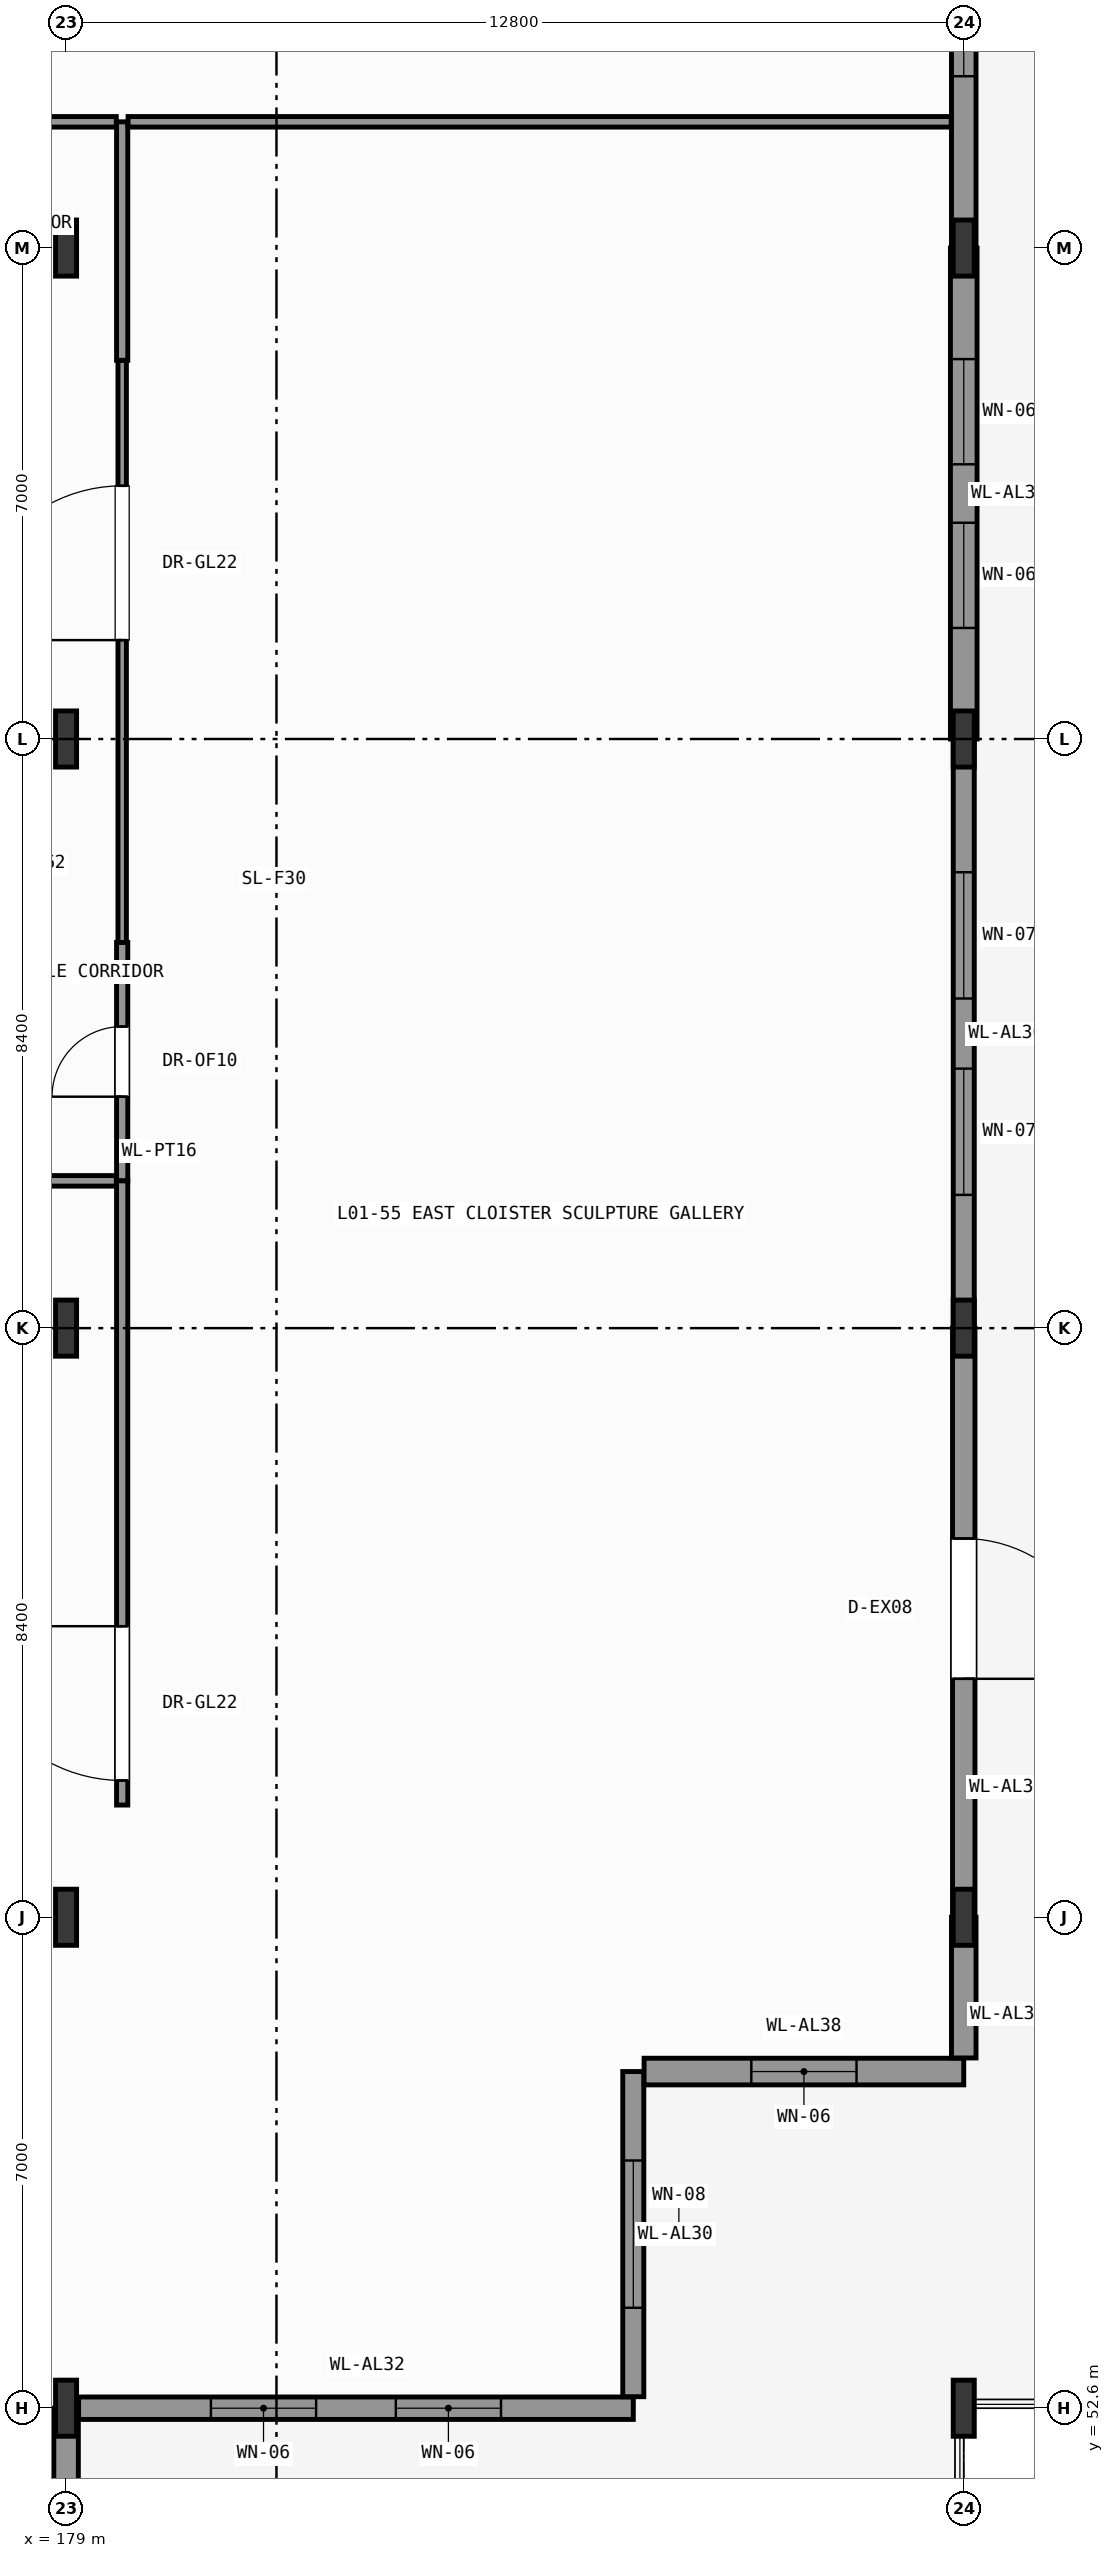
"""IFC4 building model, lengths in metres.
Left out: names, types, materials, properties, quantities, classifications, styles, units other than length and angle.
Written with IfcOpenShell. Run it as: python <this file> out.ifc"""

import sys

from ifc_helpers import new_model, si_unit, direction, frame, frame_2d, origin, origin_2d, place, context, subcontext, project, spatial, rectangle, i_section, extrude, element, fill, save


model = new_model("IFC4")
c1 = context("Model", 3, precision=1e-05, world=origin(), true_north=direction((0.0, 1.0)))
c2 = subcontext(c1, "Body", "Model", "MODEL_VIEW")
j1 = project(units=[si_unit("LENGTHUNIT", "METRE"), si_unit("PLANEANGLEUNIT", "RADIAN")], contexts=[c1])
p1 = place(None, origin())
s1 = spatial("IfcSite", under=j1, at=p1, CompositionType="ELEMENT")
p2 = place(p1, origin())
s2 = spatial("IfcBuilding", under=s1, at=p2, CompositionType="ELEMENT")
p3 = place(p2, origin())
s3 = spatial("IfcBuildingStorey", under=s2, at=p3, CompositionType="ELEMENT", Elevation=0.0)
for number, where, z_axis, x_axis in (
    (1, (179.0, 52.6, 0.0), (0.0, 0.0, 1.0), (1.0, 0.0, 0.0)),
    (2, (179.0, 59.6, 0.0), (0.0, 0.0, 1.0), (1.0, 0.0, 0.0)),
    (3, (179.0, 68.0, 0.0), (0.0, 0.0, 1.0), (1.0, 0.0, 0.0)),
    (4, (179.0, 76.4, 0.0), (0.0, 0.0, 1.0), (1.0, 0.0, 0.0)),
    (5, (179.0, 83.4, 0.0), (0.0, 0.0, 1.0), (1.0, 0.0, 0.0)),
    (6, (191.8, 52.6, 0.0), (0.0, 0.0, 1.0), (1.0, 0.0, 0.0)),
    (7, (191.8, 59.6, 0.0), (0.0, 0.0, 1.0), (1.0, 0.0, 0.0)),
    (8, (191.8, 68.0, 0.0), (0.0, 0.0, 1.0), (1.0, 0.0, 0.0)),
    (9, (191.8, 76.4, 0.0), (0.0, 0.0, 1.0), (1.0, 0.0, 0.0)),
    (10, (191.8, 83.4, 0.0), (0.0, 0.0, 1.0), (1.0, 0.0, 0.0)),
):
    element("IfcColumn", number, at=place(p3, frame(where, z_axis=z_axis, x_axis=x_axis)), inside=s3, PredefinedType="COLUMN", context=c2, shape_type="SweptSolid", body=[
        extrude(i_section(OverallWidth=0.3, OverallDepth=0.8, WebThickness=0.018, FlangeThickness=0.033, FilletRadius=0.03, at=origin_2d()), origin(), (0.0, 0.0, 1.0), 7.8),
    ])
p4 = place(p3, frame((179.0, 52.6, 0.0), z_axis=(0.0, 0.0, 1.0), x_axis=(0.0, -1.0, 0.0)))
e11 = element("IfcWall", 11, at=p4, inside=s3, PredefinedType="SOLIDWALL", context=c2, shape_type="SweptSolid", body=[
    extrude(rectangle(XDim=7.0, YDim=0.35, at=frame_2d((3.5, 0.0))), origin(), (0.0, 0.0, 1.0), 7.025),
])
p5 = place(p4, frame((1.433, 0.0, 0.95)))
e12 = element("IfcOpeningElement", 12, at=p5, cuts=e11, PredefinedType="OPENING", context=c2, shape_type="SweptSolid", body=[
    extrude(rectangle(XDim=1.8, YDim=2.6, at=frame_2d((0.9, 1.3))), frame((0.0, 0.185, 0.0), z_axis=(0.0, -1.0, 0.0), x_axis=(1.0, 0.0, 0.0)), (0.0, 0.0, 1.0), 0.37),
])
p6 = place(p4, frame((3.767, 0.0, 0.95)))
e13 = element("IfcOpeningElement", 13, at=p6, cuts=e11, PredefinedType="OPENING", context=c2, shape_type="SweptSolid", body=[
    extrude(rectangle(XDim=1.8, YDim=2.6, at=frame_2d((0.9, 1.3))), frame((0.0, 0.185, 0.0), z_axis=(0.0, -1.0, 0.0), x_axis=(1.0, 0.0, 0.0)), (0.0, 0.0, 1.0), 0.37),
])
p7 = place(p3, frame((187.088, 52.6, 0.0), z_axis=(0.0, 0.0, 1.0), x_axis=(-1.0, 0.0, 0.0)))
e14 = element("IfcWall", 14, at=p7, inside=s3, PredefinedType="SOLIDWALL", context=c2, shape_type="SweptSolid", body=[
    extrude(rectangle(XDim=7.909, YDim=0.32, at=frame_2d((3.955, 0.0))), origin(), (0.0, 0.0, 1.0), 7.54),
])
p8 = place(p7, frame((1.886, 0.0, 0.95)))
e15 = element("IfcOpeningElement", 15, at=p8, cuts=e14, PredefinedType="OPENING", context=c2, shape_type="SweptSolid", body=[
    extrude(rectangle(XDim=1.5, YDim=2.4, at=frame_2d((0.75, 1.2))), frame((0.0, 0.17, 0.0), z_axis=(0.0, -1.0, 0.0), x_axis=(1.0, 0.0, 0.0)), (0.0, 0.0, 1.0), 0.34),
])
p9 = place(p7, frame((4.523, 0.0, 0.95)))
e16 = element("IfcOpeningElement", 16, at=p9, cuts=e14, PredefinedType="OPENING", context=c2, shape_type="SweptSolid", body=[
    extrude(rectangle(XDim=1.5, YDim=2.4, at=frame_2d((0.75, 1.2))), frame((0.0, 0.17, 0.0), z_axis=(0.0, -1.0, 0.0), x_axis=(1.0, 0.0, 0.0)), (0.0, 0.0, 1.0), 0.34),
])
p10 = place(p3, frame((187.088, 57.4, 0.0), z_axis=(0.0, 0.0, 1.0), x_axis=(0.0, -1.0, 0.0)))
e17 = element("IfcWall", 17, at=p10, inside=s3, PredefinedType="SOLIDWALL", context=c2, shape_type="SweptSolid", body=[
    extrude(rectangle(XDim=4.636, YDim=0.3, at=frame_2d((2.318, 0.0))), origin(), (0.0, 0.0, 1.0), 7.54),
])
p11 = place(p10, frame((1.268, 0.0, 0.95)))
e18 = element("IfcOpeningElement", 18, at=p11, cuts=e17, PredefinedType="OPENING", context=c2, shape_type="SweptSolid", body=[
    extrude(rectangle(XDim=2.1, YDim=2.8, at=frame_2d((1.05, 1.4))), frame((0.0, 0.16, 0.0), z_axis=(0.0, -1.0, 0.0), x_axis=(1.0, 0.0, 0.0)), (0.0, 0.0, 1.0), 0.32),
])
p12 = place(p3, frame((191.8, 57.4, 0.0), z_axis=(0.0, 0.0, 1.0), x_axis=(-1.0, 0.0, 0.0)))
e19 = element("IfcWall", 19, at=p12, inside=s3, PredefinedType="SOLIDWALL", context=c2, shape_type="SweptSolid", body=[
    extrude(rectangle(XDim=4.558, YDim=0.38, at=frame_2d((2.279, 0.0))), origin(), (0.0, 0.0, 1.0), 7.54),
])
p13 = place(p12, frame((1.529, 0.0, 0.95)))
e20 = element("IfcOpeningElement", 20, at=p13, cuts=e19, PredefinedType="OPENING", context=c2, shape_type="SweptSolid", body=[
    extrude(rectangle(XDim=1.5, YDim=2.4, at=frame_2d((0.75, 1.2))), frame((0.0, 0.2, 0.0), z_axis=(0.0, -1.0, 0.0), x_axis=(1.0, 0.0, 0.0)), (0.0, 0.0, 1.0), 0.4),
])
p14 = place(p3, frame((191.8, 59.6, 0.0), z_axis=(0.0, 0.0, 1.0), x_axis=(0.0, -1.0, 0.0)))
e21 = element("IfcWall", 21, at=p14, inside=s3, PredefinedType="SOLIDWALL", context=c2, shape_type="SweptSolid", body=[
    extrude(rectangle(XDim=2.006, YDim=0.35, at=frame_2d((1.003, 0.0))), origin(), (0.0, 0.0, 1.0), 7.54),
])
p15 = place(p3, frame((191.8, 68.0, 0.0), z_axis=(0.0, 0.0, 1.0), x_axis=(0.0, -1.0, 0.0)))
e22 = element("IfcWall", 22, at=p15, inside=s3, PredefinedType="SOLIDWALL", context=c2, shape_type="SweptSolid", body=[
    extrude(rectangle(XDim=8.4, YDim=0.32, at=frame_2d((4.2, 0.0))), origin(), (0.0, 0.0, 1.0), 7.085),
])
p16 = place(p15, frame((3.0, 0.0, 0.0)))
e23 = element("IfcOpeningElement", 23, at=p16, cuts=e22, PredefinedType="OPENING", context=c2, shape_type="SweptSolid", body=[
    extrude(rectangle(XDim=2.0, YDim=2.6, at=frame_2d((1.0, 1.3))), frame((0.0, 0.17, 0.0), z_axis=(0.0, -1.0, 0.0), x_axis=(1.0, 0.0, 0.0)), (0.0, 0.0, 1.0), 0.34),
])
p17 = place(p3, frame((191.8, 76.4, 0.0), z_axis=(0.0, 0.0, 1.0), x_axis=(0.0, -1.0, 0.0)))
e24 = element("IfcWall", 24, at=p17, inside=s3, PredefinedType="SOLIDWALL", context=c2, shape_type="SweptSolid", body=[
    extrude(rectangle(XDim=8.4, YDim=0.3, at=frame_2d((4.2, 0.0))), origin(), (0.0, 0.0, 1.0), 7.085),
])
p18 = place(p17, frame((1.9, 0.0, 0.95)))
e25 = element("IfcOpeningElement", 25, at=p18, cuts=e24, PredefinedType="OPENING", context=c2, shape_type="SweptSolid", body=[
    extrude(rectangle(XDim=1.8, YDim=2.6, at=frame_2d((0.9, 1.3))), frame((0.0, 0.16, 0.0), z_axis=(0.0, -1.0, 0.0), x_axis=(1.0, 0.0, 0.0)), (0.0, 0.0, 1.0), 0.32),
])
p19 = place(p17, frame((4.7, 0.0, 0.95)))
e26 = element("IfcOpeningElement", 26, at=p19, cuts=e24, PredefinedType="OPENING", context=c2, shape_type="SweptSolid", body=[
    extrude(rectangle(XDim=1.8, YDim=2.6, at=frame_2d((0.9, 1.3))), frame((0.0, 0.16, 0.0), z_axis=(0.0, -1.0, 0.0), x_axis=(1.0, 0.0, 0.0)), (0.0, 0.0, 1.0), 0.32),
])
p20 = place(p3, frame((191.8, 83.4, 0.0), z_axis=(0.0, 0.0, 1.0), x_axis=(0.0, -1.0, 0.0)))
e27 = element("IfcWall", 27, at=p20, inside=s3, PredefinedType="SOLIDWALL", context=c2, shape_type="SweptSolid", body=[
    extrude(rectangle(XDim=7.0, YDim=0.38, at=frame_2d((3.5, 0.0))), origin(), (0.0, 0.0, 1.0), 7.235),
])
p21 = place(p20, frame((1.583, 0.0, 0.95)))
e28 = element("IfcOpeningElement", 28, at=p21, cuts=e27, PredefinedType="OPENING", context=c2, shape_type="SweptSolid", body=[
    extrude(rectangle(XDim=1.5, YDim=2.4, at=frame_2d((0.75, 1.2))), frame((0.0, 0.2, 0.0), z_axis=(0.0, -1.0, 0.0), x_axis=(1.0, 0.0, 0.0)), (0.0, 0.0, 1.0), 0.4),
])
p22 = place(p20, frame((3.917, 0.0, 0.95)))
e29 = element("IfcOpeningElement", 29, at=p22, cuts=e27, PredefinedType="OPENING", context=c2, shape_type="SweptSolid", body=[
    extrude(rectangle(XDim=1.5, YDim=2.4, at=frame_2d((0.75, 1.2))), frame((0.0, 0.2, 0.0), z_axis=(0.0, -1.0, 0.0), x_axis=(1.0, 0.0, 0.0)), (0.0, 0.0, 1.0), 0.4),
])
p23 = place(p3, frame((191.8, 90.4, 0.0), z_axis=(0.0, 0.0, 1.0), x_axis=(0.0, -1.0, 0.0)))
e30 = element("IfcWall", 30, at=p23, inside=s3, PredefinedType="SOLIDWALL", context=c2, shape_type="SweptSolid", body=[
    extrude(rectangle(XDim=7.0, YDim=0.35, at=frame_2d((3.5, 0.0))), origin(), (0.0, 0.0, 1.0), 7.235),
])
p24 = place(p23, frame((2.45, 0.0, 0.95)))
e31 = element("IfcOpeningElement", 31, at=p24, cuts=e30, PredefinedType="OPENING", context=c2, shape_type="SweptSolid", body=[
    extrude(rectangle(XDim=2.1, YDim=2.8, at=frame_2d((1.05, 1.4))), frame((0.0, 0.185, 0.0), z_axis=(0.0, -1.0, 0.0), x_axis=(1.0, 0.0, 0.0)), (0.0, 0.0, 1.0), 0.37),
])
p25 = place(p3, frame((179.8, 70.1, 0.0), z_axis=(0.0, 0.0, 1.0), x_axis=(0.0, 1.0, 0.0)))
e32 = element("IfcWall", 32, at=p25, inside=s3, PredefinedType="PARTITIONING", context=c2, shape_type="SweptSolid", body=[
    extrude(rectangle(XDim=3.4, YDim=0.16, at=frame_2d((1.7, 0.0))), origin(), (0.0, 0.0, 1.0), 7.54),
])
p26 = place(p25, frame((1.2, 0.0, 0.0)))
e33 = element("IfcOpeningElement", 33, at=p26, cuts=e32, PredefinedType="OPENING", context=c2, shape_type="SweptSolid", body=[
    extrude(rectangle(XDim=1.0, YDim=2.15, at=frame_2d((0.5, 1.075))), frame((0.0, 0.09, 0.0), z_axis=(0.0, -1.0, 0.0), x_axis=(1.0, 0.0, 0.0)), (0.0, 0.0, 1.0), 0.18),
])
p27 = place(p3, frame((170.464, 70.1, 0.0), z_axis=(0.0, 0.0, 1.0), x_axis=(1.0, 0.0, 0.0)))
e34 = element("IfcWall", 34, at=p27, inside=s3, PredefinedType="PARTITIONING", context=c2, shape_type="SweptSolid", body=[
    extrude(rectangle(XDim=9.252, YDim=0.15, at=frame_2d((4.626, 0.0))), origin(), (0.0, 0.0, 1.0), 7.54),
])
p28 = place(p27, frame((3.526, 0.0, 0.0)))
e35 = element("IfcOpeningElement", 35, at=p28, cuts=e34, PredefinedType="OPENING", context=c2, shape_type="SweptSolid", body=[
    extrude(rectangle(XDim=2.2, YDim=2.6, at=frame_2d((1.1, 1.3))), frame((0.0, 0.085, 0.0), z_axis=(0.0, -1.0, 0.0), x_axis=(1.0, 0.0, 0.0)), (0.0, 0.0, 1.0), 0.17),
])
p29 = place(p3, frame((179.8, 73.5, 0.0), z_axis=(0.0, 0.0, 1.0), x_axis=(0.0, 1.0, 0.0)))
e36 = element("IfcWall", 36, at=p29, inside=s3, PredefinedType="PARTITIONING", context=c2, shape_type="SweptSolid", body=[
    extrude(rectangle(XDim=8.3, YDim=0.12, at=frame_2d((4.15, 0.0))), origin(), (0.0, 0.0, 1.0), 7.54),
])
p30 = place(p29, frame((4.31, 0.0, 0.0)))
e37 = element("IfcOpeningElement", 37, at=p30, cuts=e36, PredefinedType="OPENING", context=c2, shape_type="SweptSolid", body=[
    extrude(rectangle(XDim=2.2, YDim=2.6, at=frame_2d((1.1, 1.3))), frame((0.0, 0.07, 0.0), z_axis=(0.0, -1.0, 0.0), x_axis=(1.0, 0.0, 0.0)), (0.0, 0.0, 1.0), 0.14),
])
p31 = place(p3, frame((179.8, 81.8, 0.0), z_axis=(0.0, 0.0, 1.0), x_axis=(0.0, 1.0, 0.0)))
e38 = element("IfcWall", 38, at=p31, inside=s3, PredefinedType="PARTITIONING", context=c2, shape_type="SweptSolid", body=[
    extrude(rectangle(XDim=3.4, YDim=0.16, at=frame_2d((1.7, 0.0))), origin(), (0.0, 0.0, 1.0), 7.54),
])
p32 = place(p3, frame((170.4, 85.2, 0.0), z_axis=(0.0, 0.0, 1.0), x_axis=(1.0, 0.0, 0.0)))
e39 = element("IfcWall", 39, at=p32, inside=s3, PredefinedType="PARTITIONING", context=c2, shape_type="SweptSolid", body=[
    extrude(rectangle(XDim=9.316, YDim=0.15, at=frame_2d((4.658, 0.0))), origin(), (0.0, 0.0, 1.0), 7.54),
])
p33 = place(p32, frame((4.183, 0.0, 0.0)))
e40 = element("IfcOpeningElement", 40, at=p33, cuts=e39, PredefinedType="OPENING", context=c2, shape_type="SweptSolid", body=[
    extrude(rectangle(XDim=0.95, YDim=2.1, at=frame_2d((0.475, 1.05))), frame((0.0, 0.085, 0.0), z_axis=(0.0, -1.0, 0.0), x_axis=(1.0, 0.0, 0.0)), (0.0, 0.0, 1.0), 0.17),
])
p34 = place(p3, frame((179.8, 61.2, 0.0), z_axis=(0.0, 0.0, 1.0), x_axis=(0.0, 1.0, 0.0)))
e41 = element("IfcWall", 41, at=p34, inside=s3, PredefinedType="PARTITIONING", context=c2, shape_type="SweptSolid", body=[
    extrude(rectangle(XDim=8.9, YDim=0.16, at=frame_2d((4.45, 0.0))), origin(), (0.0, 0.0, 1.0), 7.54),
])
p35 = place(p34, frame((0.35, 0.0, 0.0)))
e42 = element("IfcOpeningElement", 42, at=p35, cuts=e41, PredefinedType="OPENING", context=c2, shape_type="SweptSolid", body=[
    extrude(rectangle(XDim=2.2, YDim=2.6, at=frame_2d((1.1, 1.3))), frame((0.0, 0.09, 0.0), z_axis=(0.0, -1.0, 0.0), x_axis=(1.0, 0.0, 0.0)), (0.0, 0.0, 1.0), 0.18),
])
p36 = place(p3, frame((179.884, 85.2, 0.0), z_axis=(0.0, 0.0, 1.0), x_axis=(1.0, 0.0, 0.0)))
e43 = element("IfcWall", 43, at=p36, inside=s3, PredefinedType="PARTITIONING", context=c2, shape_type="SweptSolid", body=[
    extrude(rectangle(XDim=11.737, YDim=0.15, at=frame_2d((5.869, 0.0))), origin(), (0.0, 0.0, 1.0), 7.54),
])
p37 = place(p8, origin())
e44 = element("IfcWindow", 44, at=p37, inside=s3, PartitioningType="SINGLE_PANEL", PredefinedType="WINDOW", context=c2, shape_type="SweptSolid", body=[
    extrude(rectangle(XDim=1.5, YDim=2.4, at=frame_2d((0.75, 1.2))), frame((0.0, 0.03, 0.0), z_axis=(0.0, -1.0, 0.0), x_axis=(1.0, 0.0, 0.0)), (0.0, 0.0, 1.0), 0.06),
])
fill(e15, e44)
p38 = place(p9, origin())
e45 = element("IfcWindow", 45, at=p38, inside=s3, PartitioningType="SINGLE_PANEL", PredefinedType="WINDOW", context=c2, shape_type="SweptSolid", body=[
    extrude(rectangle(XDim=1.5, YDim=2.4, at=frame_2d((0.75, 1.2))), frame((0.0, 0.03, 0.0), z_axis=(0.0, -1.0, 0.0), x_axis=(1.0, 0.0, 0.0)), (0.0, 0.0, 1.0), 0.06),
])
fill(e16, e45)
p39 = place(p11, origin())
e46 = element("IfcWindow", 46, at=p39, inside=s3, PartitioningType="SINGLE_PANEL", PredefinedType="WINDOW", context=c2, shape_type="SweptSolid", body=[
    extrude(rectangle(XDim=2.1, YDim=2.8, at=frame_2d((1.05, 1.4))), frame((0.0, 0.03, 0.0), z_axis=(0.0, -1.0, 0.0), x_axis=(1.0, 0.0, 0.0)), (0.0, 0.0, 1.0), 0.06),
])
fill(e18, e46)
p40 = place(p13, origin())
e47 = element("IfcWindow", 47, at=p40, inside=s3, PartitioningType="SINGLE_PANEL", PredefinedType="WINDOW", context=c2, shape_type="SweptSolid", body=[
    extrude(rectangle(XDim=1.5, YDim=2.4, at=frame_2d((0.75, 1.2))), frame((0.0, 0.03, 0.0), z_axis=(0.0, -1.0, 0.0), x_axis=(1.0, 0.0, 0.0)), (0.0, 0.0, 1.0), 0.06),
])
fill(e20, e47)
p41 = place(p16, origin())
e48 = element("IfcDoor", 48, at=p41, inside=s3, OperationType="SINGLE_SWING_RIGHT", PredefinedType="DOOR", context=c2, shape_type="SweptSolid", body=[
    extrude(rectangle(XDim=2.0, YDim=2.6, at=frame_2d((1.0, 1.3))), frame((0.0, 0.025, 0.0), z_axis=(0.0, -1.0, 0.0), x_axis=(1.0, 0.0, 0.0)), (0.0, 0.0, 1.0), 0.05),
])
fill(e23, e48)
p42 = place(p18, origin())
e49 = element("IfcWindow", 49, at=p42, inside=s3, PartitioningType="SINGLE_PANEL", PredefinedType="WINDOW", context=c2, shape_type="SweptSolid", body=[
    extrude(rectangle(XDim=1.8, YDim=2.6, at=frame_2d((0.9, 1.3))), frame((0.0, 0.03, 0.0), z_axis=(0.0, -1.0, 0.0), x_axis=(1.0, 0.0, 0.0)), (0.0, 0.0, 1.0), 0.06),
])
fill(e25, e49)
p43 = place(p19, origin())
e50 = element("IfcWindow", 50, at=p43, inside=s3, PartitioningType="SINGLE_PANEL", PredefinedType="WINDOW", context=c2, shape_type="SweptSolid", body=[
    extrude(rectangle(XDim=1.8, YDim=2.6, at=frame_2d((0.9, 1.3))), frame((0.0, 0.03, 0.0), z_axis=(0.0, -1.0, 0.0), x_axis=(1.0, 0.0, 0.0)), (0.0, 0.0, 1.0), 0.06),
])
fill(e26, e50)
p44 = place(p21, origin())
e51 = element("IfcWindow", 51, at=p44, inside=s3, PartitioningType="SINGLE_PANEL", PredefinedType="WINDOW", context=c2, shape_type="SweptSolid", body=[
    extrude(rectangle(XDim=1.5, YDim=2.4, at=frame_2d((0.75, 1.2))), frame((0.0, 0.03, 0.0), z_axis=(0.0, -1.0, 0.0), x_axis=(1.0, 0.0, 0.0)), (0.0, 0.0, 1.0), 0.06),
])
fill(e28, e51)
p45 = place(p22, origin())
e52 = element("IfcWindow", 52, at=p45, inside=s3, PartitioningType="SINGLE_PANEL", PredefinedType="WINDOW", context=c2, shape_type="SweptSolid", body=[
    extrude(rectangle(XDim=1.5, YDim=2.4, at=frame_2d((0.75, 1.2))), frame((0.0, 0.03, 0.0), z_axis=(0.0, -1.0, 0.0), x_axis=(1.0, 0.0, 0.0)), (0.0, 0.0, 1.0), 0.06),
])
fill(e29, e52)
p46 = place(p24, origin())
e53 = element("IfcWindow", 53, at=p46, inside=s3, PartitioningType="SINGLE_PANEL", PredefinedType="WINDOW", context=c2, shape_type="SweptSolid", body=[
    extrude(rectangle(XDim=2.1, YDim=2.8, at=frame_2d((1.05, 1.4))), frame((0.0, 0.03, 0.0), z_axis=(0.0, -1.0, 0.0), x_axis=(1.0, 0.0, 0.0)), (0.0, 0.0, 1.0), 0.06),
])
fill(e31, e53)
p47 = place(p26, origin())
e54 = element("IfcDoor", 54, at=p47, inside=s3, OperationType="SINGLE_SWING_LEFT", PredefinedType="DOOR", context=c2, shape_type="SweptSolid", body=[
    extrude(rectangle(XDim=1.0, YDim=2.15, at=frame_2d((0.5, 1.075))), frame((0.0, 0.025, 0.0), z_axis=(0.0, -1.0, 0.0), x_axis=(1.0, 0.0, 0.0)), (0.0, 0.0, 1.0), 0.05),
])
fill(e33, e54)
p48 = place(p30, origin())
e55 = element("IfcDoor", 55, at=p48, inside=s3, OperationType="SINGLE_SWING_LEFT", PredefinedType="DOOR", context=c2, shape_type="SweptSolid", body=[
    extrude(rectangle(XDim=2.2, YDim=2.6, at=frame_2d((1.1, 1.3))), frame((0.0, 0.025, 0.0), z_axis=(0.0, -1.0, 0.0), x_axis=(1.0, 0.0, 0.0)), (0.0, 0.0, 1.0), 0.05),
])
fill(e37, e55)
p49 = place(p35, origin())
e56 = element("IfcDoor", 56, at=p49, inside=s3, OperationType="SINGLE_SWING_RIGHT", PredefinedType="DOOR", context=c2, shape_type="SweptSolid", body=[
    extrude(rectangle(XDim=2.2, YDim=2.6, at=frame_2d((1.1, 1.3))), frame((0.0, 0.025, 0.0), z_axis=(0.0, -1.0, 0.0), x_axis=(1.0, 0.0, 0.0)), (0.0, 0.0, 1.0), 0.05),
])
fill(e42, e56)
save(model, sys.argv[1])
